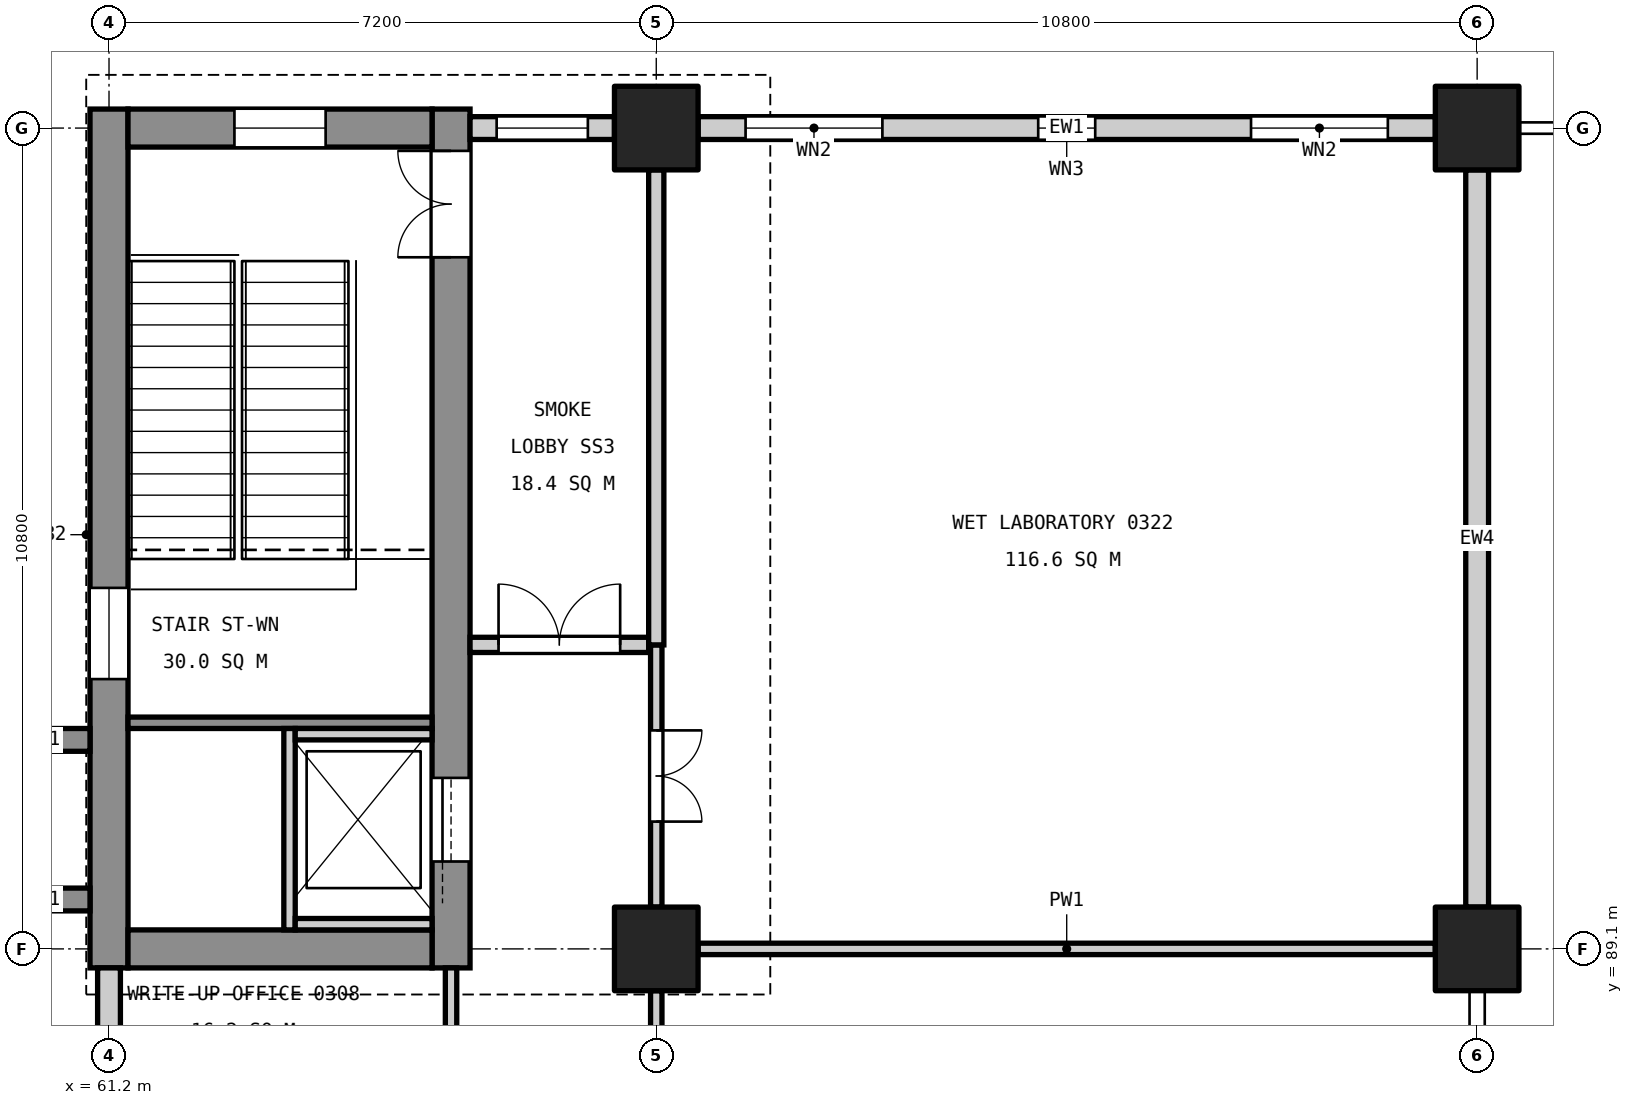
"""IFC4 building model, lengths in metres.
Left out: names, types, materials, properties, quantities, classifications, styles, units other than length and angle.
Written with IfcOpenShell. Run it as: python <this file> out.ifc"""

import sys

from ifc_helpers import new_model, si_unit, direction, frame, frame_2d, origin, origin_2d, place, context, subcontext, project, spatial, rectangle, extrude, element, fill, save


model = new_model("IFC4")
c1 = context("Model", 3, precision=1e-05, world=origin(), true_north=direction((0.0, 1.0)))
c2 = subcontext(c1, "Body", "Model", "MODEL_VIEW")
j1 = project(units=[si_unit("LENGTHUNIT", "METRE"), si_unit("PLANEANGLEUNIT", "RADIAN")], contexts=[c1])
p1 = place(None, origin())
s1 = spatial("IfcSite", under=j1, at=p1, CompositionType="ELEMENT")
p2 = place(p1, origin())
s2 = spatial("IfcBuilding", under=s1, at=p2, CompositionType="ELEMENT")
p3 = place(p2, frame((0.0, 0.0, 16.8)))
s3 = spatial("IfcBuildingStorey", under=s2, at=p3, CompositionType="ELEMENT", Elevation=16.8)
for number, where, z_axis, x_axis in (
    (1, (68.4, 89.1, 0.0), (0.0, 0.0, 1.0), (1.0, 0.0, 0.0)),
    (2, (68.4, 99.9, 0.0), (0.0, 0.0, 1.0), (1.0, 0.0, 0.0)),
    (3, (79.2, 89.1, 0.0), (0.0, 0.0, 1.0), (1.0, 0.0, 0.0)),
    (4, (79.2, 99.9, 0.0), (0.0, 0.0, 1.0), (1.0, 0.0, 0.0)),
):
    element("IfcColumn", number, at=place(p3, frame(where, z_axis=z_axis, x_axis=x_axis)), inside=s3, PredefinedType="COLUMN", context=c2, shape_type="SweptSolid", body=[
        extrude(rectangle(XDim=1.1, YDim=1.1, at=origin_2d()), origin(), (0.0, 0.0, 1.0), 5.4),
    ])
p4 = place(p3, frame((61.2, 88.85, 0.0), z_axis=(0.0, 0.0, 1.0), x_axis=(0.0, 1.0, 0.0)))
e5 = element("IfcWall", 5, at=p4, inside=s3, PredefinedType="SHEAR", context=c2, shape_type="SweptSolid", body=[
    extrude(rectangle(XDim=11.3, YDim=0.5, at=frame_2d((5.65, 0.0))), origin(), (0.0, 0.0, 1.0), 5.15),
])
p5 = place(p4, frame((3.8, 0.0, 3.4)))
e6 = element("IfcOpeningElement", 6, at=p5, cuts=e5, PredefinedType="OPENING", context=c2, shape_type="SweptSolid", body=[
    extrude(rectangle(XDim=1.2, YDim=0.9, at=frame_2d((0.6, 0.45))), frame((0.0, 0.26, 0.0), z_axis=(0.0, -1.0, 0.0), x_axis=(1.0, 0.0, 0.0)), (0.0, 0.0, 1.0), 0.52),
])
p6 = place(p3, frame((65.7, 88.85, 0.0), z_axis=(0.0, 0.0, 1.0), x_axis=(0.0, 1.0, 0.0)))
e7 = element("IfcWall", 7, at=p6, inside=s3, PredefinedType="SHEAR", context=c2, shape_type="SweptSolid", body=[
    extrude(rectangle(XDim=11.3, YDim=0.5, at=frame_2d((5.65, 0.0))), origin(), (0.0, 0.0, 1.0), 5.15),
])
p7 = place(p6, frame((9.35, 0.0, 0.0)))
e8 = element("IfcOpeningElement", 8, at=p7, cuts=e7, PredefinedType="OPENING", context=c2, shape_type="SweptSolid", body=[
    extrude(rectangle(XDim=1.4, YDim=2.1, at=frame_2d((0.7, 1.05))), frame((0.0, 0.26, 0.0), z_axis=(0.0, -1.0, 0.0), x_axis=(1.0, 0.0, 0.0)), (0.0, 0.0, 1.0), 0.52),
])
p8 = place(p6, frame((1.4, 0.0, 0.0)))
e9 = element("IfcOpeningElement", 9, at=p8, cuts=e7, PredefinedType="OPENING", context=c2, shape_type="SweptSolid", body=[
    extrude(rectangle(XDim=1.1, YDim=2.1, at=frame_2d((0.55, 1.05))), frame((0.0, 0.26, 0.0), z_axis=(0.0, -1.0, 0.0), x_axis=(1.0, 0.0, 0.0)), (0.0, 0.0, 1.0), 0.52),
])
p9 = place(p3, frame((61.45, 89.1, 0.0), z_axis=(0.0, 0.0, 1.0), x_axis=(1.0, 0.0, 0.0)))
e10 = element("IfcWall", 10, at=p9, inside=s3, PredefinedType="SHEAR", context=c2, shape_type="SweptSolid", body=[
    extrude(rectangle(XDim=4.0, YDim=0.5, at=frame_2d((2.0, 0.0))), origin(), (0.0, 0.0, 1.0), 5.15),
])
p10 = place(p3, frame((61.45, 99.9, 0.0), z_axis=(0.0, 0.0, 1.0), x_axis=(1.0, 0.0, 0.0)))
e11 = element("IfcWall", 11, at=p10, inside=s3, PredefinedType="SHEAR", context=c2, shape_type="SweptSolid", body=[
    extrude(rectangle(XDim=4.0, YDim=0.5, at=frame_2d((2.0, 0.0))), origin(), (0.0, 0.0, 1.0), 5.15),
])
p11 = place(p10, frame((1.4, 0.0, 3.4)))
e12 = element("IfcOpeningElement", 12, at=p11, cuts=e11, PredefinedType="OPENING", context=c2, shape_type="SweptSolid", body=[
    extrude(rectangle(XDim=1.2, YDim=0.9, at=frame_2d((0.6, 0.45))), frame((0.0, 0.26, 0.0), z_axis=(0.0, -1.0, 0.0), x_axis=(1.0, 0.0, 0.0)), (0.0, 0.0, 1.0), 0.52),
])
for number, where, z_axis, x_axis in (
    (13, (60.95, 89.75, 0.0), (0.0, 0.0, 1.0), (-1.0, 0.0, 0.0)),
    (14, (60.95, 91.85, 0.0), (0.0, 0.0, 1.0), (-1.0, 0.0, 0.0)),
):
    element("IfcWall", number, at=place(p3, frame(where, z_axis=z_axis, x_axis=x_axis)), inside=s3, PredefinedType="SHEAR", context=c2, shape_type="SweptSolid", body=[
        extrude(rectangle(XDim=1.25, YDim=0.3, at=frame_2d((0.625, 0.0))), origin(), (0.0, 0.0, 1.0), 5.4),
    ])
p12 = place(p3, frame((61.45, 92.075, 0.0), z_axis=(0.0, 0.0, 1.0), x_axis=(1.0, 0.0, 0.0)))
e15 = element("IfcWall", 15, at=p12, inside=s3, PredefinedType="SOLIDWALL", context=c2, shape_type="SweptSolid", body=[
    extrude(rectangle(XDim=4.0, YDim=0.15, at=frame_2d((2.0, 0.0))), origin(), (0.0, 0.0, 1.0), 5.15),
])
p13 = place(p3, frame((63.575, 92.0, 0.0), z_axis=(0.0, 0.0, 1.0), x_axis=(0.0, -1.0, 0.0)))
e16 = element("IfcWall", 16, at=p13, inside=s3, PredefinedType="SOLIDWALL", context=c2, shape_type="SweptSolid", body=[
    extrude(rectangle(XDim=2.65, YDim=0.15, at=frame_2d((1.325, 0.0))), origin(), (0.0, 0.0, 1.0), 5.4),
])
for number, where, z_axis, x_axis in (
    (17, (63.65, 91.925, 0.0), (0.0, 0.0, 1.0), (1.0, 0.0, 0.0)),
    (18, (63.65, 89.425, 0.0), (0.0, 0.0, 1.0), (1.0, 0.0, 0.0)),
):
    element("IfcWall", number, at=place(p3, frame(where, z_axis=z_axis, x_axis=x_axis)), inside=s3, PredefinedType="SOLIDWALL", context=c2, shape_type="SweptSolid", body=[
        extrude(rectangle(XDim=1.8, YDim=0.15, at=frame_2d((0.9, 0.0))), origin(), (0.0, 0.0, 1.0), 5.4),
    ])
p14 = place(p3, frame((61.2, 78.85, 0.0), z_axis=(0.0, 0.0, 1.0), x_axis=(0.0, 1.0, 0.0)))
e19 = element("IfcWall", 19, at=p14, inside=s3, PredefinedType="STANDARD", context=c2, shape_type="SweptSolid", body=[
    extrude(rectangle(XDim=10.0, YDim=0.3, at=frame_2d((5.0, 0.0))), origin(), (0.0, 0.0, 1.0), 4.25),
])
p15 = place(p14, frame((0.625, 0.0, 0.9)))
e20 = element("IfcOpeningElement", 20, at=p15, cuts=e19, PredefinedType="OPENING", context=c2, shape_type="SweptSolid", body=[
    extrude(rectangle(XDim=1.8, YDim=3.0, at=frame_2d((0.9, 1.5))), frame((0.0, 0.16, 0.0), z_axis=(0.0, -1.0, 0.0), x_axis=(1.0, 0.0, 0.0)), (0.0, 0.0, 1.0), 0.32),
])
p16 = place(p14, frame((3.95, 0.0, 0.9)))
e21 = element("IfcOpeningElement", 21, at=p16, cuts=e19, PredefinedType="OPENING", context=c2, shape_type="SweptSolid", body=[
    extrude(rectangle(XDim=1.8, YDim=3.0, at=frame_2d((0.9, 1.5))), frame((0.0, 0.16, 0.0), z_axis=(0.0, -1.0, 0.0), x_axis=(1.0, 0.0, 0.0)), (0.0, 0.0, 1.0), 0.32),
])
p17 = place(p14, frame((7.95, 0.0, 0.8)))
e22 = element("IfcOpeningElement", 22, at=p17, cuts=e19, PredefinedType="OPENING", context=c2, shape_type="SweptSolid", body=[
    extrude(rectangle(XDim=0.75, YDim=1.2, at=frame_2d((0.375, 0.6))), frame((0.0, 0.16, 0.0), z_axis=(0.0, -1.0, 0.0), x_axis=(1.0, 0.0, 0.0)), (0.0, 0.0, 1.0), 0.32),
])
p18 = place(p3, frame((65.95, 99.9, 0.0), z_axis=(0.0, 0.0, 1.0), x_axis=(1.0, 0.0, 0.0)))
e23 = element("IfcWall", 23, at=p18, inside=s3, PredefinedType="STANDARD", context=c2, shape_type="SweptSolid", body=[
    extrude(rectangle(XDim=1.9, YDim=0.3, at=frame_2d((0.95, 0.0))), origin(), (0.0, 0.0, 1.0), 4.45),
])
p19 = place(p18, frame((0.35, 0.0, 0.9)))
e24 = element("IfcOpeningElement", 24, at=p19, cuts=e23, PredefinedType="OPENING", context=c2, shape_type="SweptSolid", body=[
    extrude(rectangle(XDim=1.2, YDim=2.4, at=frame_2d((0.6, 1.2))), frame((0.0, 0.16, 0.0), z_axis=(0.0, -1.0, 0.0), x_axis=(1.0, 0.0, 0.0)), (0.0, 0.0, 1.0), 0.32),
])
p20 = place(p3, frame((68.95, 99.9, 0.0), z_axis=(0.0, 0.0, 1.0), x_axis=(1.0, 0.0, 0.0)))
e25 = element("IfcWall", 25, at=p20, inside=s3, PredefinedType="STANDARD", context=c2, shape_type="SweptSolid", body=[
    extrude(rectangle(XDim=9.7, YDim=0.3, at=frame_2d((4.85, 0.0))), origin(), (0.0, 0.0, 1.0), 4.45),
])
p21 = place(p20, frame((0.625, 0.0, 0.9)))
e26 = element("IfcOpeningElement", 26, at=p21, cuts=e25, PredefinedType="OPENING", context=c2, shape_type="SweptSolid", body=[
    extrude(rectangle(XDim=1.8, YDim=3.0, at=frame_2d((0.9, 1.5))), frame((0.0, 0.16, 0.0), z_axis=(0.0, -1.0, 0.0), x_axis=(1.0, 0.0, 0.0)), (0.0, 0.0, 1.0), 0.32),
])
p22 = place(p20, frame((4.475, 0.0, 0.8)))
e27 = element("IfcOpeningElement", 27, at=p22, cuts=e25, PredefinedType="OPENING", context=c2, shape_type="SweptSolid", body=[
    extrude(rectangle(XDim=0.75, YDim=1.2, at=frame_2d((0.375, 0.6))), frame((0.0, 0.16, 0.0), z_axis=(0.0, -1.0, 0.0), x_axis=(1.0, 0.0, 0.0)), (0.0, 0.0, 1.0), 0.32),
])
p23 = place(p20, frame((7.275, 0.0, 0.9)))
e28 = element("IfcOpeningElement", 28, at=p23, cuts=e25, PredefinedType="OPENING", context=c2, shape_type="SweptSolid", body=[
    extrude(rectangle(XDim=1.8, YDim=3.0, at=frame_2d((0.9, 1.5))), frame((0.0, 0.16, 0.0), z_axis=(0.0, -1.0, 0.0), x_axis=(1.0, 0.0, 0.0)), (0.0, 0.0, 1.0), 0.32),
])
p24 = place(p3, frame((79.2, 89.65, 0.0), z_axis=(0.0, 0.0, 1.0), x_axis=(0.0, 1.0, 0.0)))
e29 = element("IfcWall", 29, at=p24, inside=s3, PredefinedType="STANDARD", context=c2, shape_type="SweptSolid", body=[
    extrude(rectangle(XDim=9.7, YDim=0.3, at=frame_2d((4.85, 0.0))), origin(), (0.0, 0.0, 1.0), 4.15),
])
p25 = place(p3, frame((65.7, 78.45, 0.0), z_axis=(0.0, 0.0, 1.0), x_axis=(0.0, 1.0, 0.0)))
e30 = element("IfcWall", 30, at=p25, inside=s3, PredefinedType="PARTITIONING", context=c2, shape_type="SweptSolid", body=[
    extrude(rectangle(XDim=10.4, YDim=0.15, at=frame_2d((5.2, 0.0))), origin(), (0.0, 0.0, 1.0), 4.05),
])
p26 = place(p25, frame((4.75, 0.0, 0.0)))
e31 = element("IfcOpeningElement", 31, at=p26, cuts=e30, PredefinedType="OPENING", context=c2, shape_type="SweptSolid", body=[
    extrude(rectangle(XDim=1.0, YDim=2.1, at=frame_2d((0.5, 1.05))), frame((0.0, 0.085, 0.0), z_axis=(0.0, -1.0, 0.0), x_axis=(1.0, 0.0, 0.0)), (0.0, 0.0, 1.0), 0.17),
])
p27 = place(p25, frame((1.15, 0.0, 0.0)))
e32 = element("IfcOpeningElement", 32, at=p27, cuts=e30, PredefinedType="OPENING", context=c2, shape_type="SweptSolid", body=[
    extrude(rectangle(XDim=1.0, YDim=2.1, at=frame_2d((0.5, 1.05))), frame((0.0, 0.085, 0.0), z_axis=(0.0, -1.0, 0.0), x_axis=(1.0, 0.0, 0.0)), (0.0, 0.0, 1.0), 0.17),
])
p28 = place(p25, frame((8.35, 0.0, 0.0)))
e33 = element("IfcOpeningElement", 33, at=p28, cuts=e30, PredefinedType="OPENING", context=c2, shape_type="SweptSolid", body=[
    extrude(rectangle(XDim=1.0, YDim=2.1, at=frame_2d((0.5, 1.05))), frame((0.0, 0.085, 0.0), z_axis=(0.0, -1.0, 0.0), x_axis=(1.0, 0.0, 0.0)), (0.0, 0.0, 1.0), 0.17),
])
p29 = place(p3, frame((65.95, 93.1, 0.0), z_axis=(0.0, 0.0, 1.0), x_axis=(1.0, 0.0, 0.0)))
e34 = element("IfcWall", 34, at=p29, inside=s3, PredefinedType="PARTITIONING", context=c2, shape_type="SweptSolid", body=[
    extrude(rectangle(XDim=2.35, YDim=0.2, at=frame_2d((1.175, 0.0))), origin(), (0.0, 0.0, 1.0), 4.05),
])
p30 = place(p29, frame((0.375, 0.0, 0.0)))
e35 = element("IfcOpeningElement", 35, at=p30, cuts=e34, PredefinedType="OPENING", context=c2, shape_type="SweptSolid", body=[
    extrude(rectangle(XDim=1.6, YDim=2.1, at=frame_2d((0.8, 1.05))), frame((0.0, 0.11, 0.0), z_axis=(0.0, -1.0, 0.0), x_axis=(1.0, 0.0, 0.0)), (0.0, 0.0, 1.0), 0.22),
])
p31 = place(p3, frame((68.4, 78.85, 0.0), z_axis=(0.0, 0.0, 1.0), x_axis=(0.0, 1.0, 0.0)))
e36 = element("IfcWall", 36, at=p31, inside=s3, PredefinedType="PARTITIONING", context=c2, shape_type="SweptSolid", body=[
    extrude(rectangle(XDim=9.7, YDim=0.15, at=frame_2d((4.85, 0.0))), origin(), (0.0, 0.0, 1.0), 4.15),
])
p32 = place(p31, frame((5.775, 0.0, 0.0)))
e37 = element("IfcOpeningElement", 37, at=p32, cuts=e36, PredefinedType="OPENING", context=c2, shape_type="SweptSolid", body=[
    extrude(rectangle(XDim=1.2, YDim=2.1, at=frame_2d((0.6, 1.05))), frame((0.0, 0.085, 0.0), z_axis=(0.0, -1.0, 0.0), x_axis=(1.0, 0.0, 0.0)), (0.0, 0.0, 1.0), 0.17),
])
p33 = place(p31, frame((0.925, 0.0, 0.0)))
e38 = element("IfcOpeningElement", 38, at=p33, cuts=e36, PredefinedType="OPENING", context=c2, shape_type="SweptSolid", body=[
    extrude(rectangle(XDim=1.2, YDim=2.1, at=frame_2d((0.6, 1.05))), frame((0.0, 0.085, 0.0), z_axis=(0.0, -1.0, 0.0), x_axis=(1.0, 0.0, 0.0)), (0.0, 0.0, 1.0), 0.17),
])
p34 = place(p3, frame((68.4, 89.65, 0.0), z_axis=(0.0, 0.0, 1.0), x_axis=(0.0, 1.0, 0.0)))
e39 = element("IfcWall", 39, at=p34, inside=s3, PredefinedType="PARTITIONING", context=c2, shape_type="SweptSolid", body=[
    extrude(rectangle(XDim=3.45, YDim=0.15, at=frame_2d((1.725, 0.0))), origin(), (0.0, 0.0, 1.0), 4.15),
])
p35 = place(p34, frame((1.125, 0.0, 0.0)))
e40 = element("IfcOpeningElement", 40, at=p35, cuts=e39, PredefinedType="OPENING", context=c2, shape_type="SweptSolid", body=[
    extrude(rectangle(XDim=1.2, YDim=2.1, at=frame_2d((0.6, 1.05))), frame((0.0, 0.085, 0.0), z_axis=(0.0, -1.0, 0.0), x_axis=(1.0, 0.0, 0.0)), (0.0, 0.0, 1.0), 0.17),
])
p36 = place(p3, frame((68.4, 93.1, 0.0), z_axis=(0.0, 0.0, 1.0), x_axis=(0.0, 1.0, 0.0)))
e41 = element("IfcWall", 41, at=p36, inside=s3, PredefinedType="PARTITIONING", context=c2, shape_type="SweptSolid", body=[
    extrude(rectangle(XDim=6.25, YDim=0.2, at=frame_2d((3.125, 0.0))), origin(), (0.0, 0.0, 1.0), 4.15),
])
p37 = place(p3, frame((68.95, 89.1, 0.0), z_axis=(0.0, 0.0, 1.0), x_axis=(1.0, 0.0, 0.0)))
e42 = element("IfcWall", 42, at=p37, inside=s3, PredefinedType="PARTITIONING", context=c2, shape_type="SweptSolid", body=[
    extrude(rectangle(XDim=9.7, YDim=0.15, at=frame_2d((4.85, 0.0))), origin(), (0.0, 0.0, 1.0), 4.05),
])
p38 = place(p7, origin())
e43 = element("IfcDoor", 43, at=p38, inside=s3, OperationType="DOUBLE_DOOR_SINGLE_SWING", PredefinedType="DOOR", context=c2, shape_type="SweptSolid", body=[
    extrude(rectangle(XDim=1.4, YDim=2.1, at=frame_2d((0.7, 1.05))), frame((0.0, 0.025, 0.0), z_axis=(0.0, -1.0, 0.0), x_axis=(1.0, 0.0, 0.0)), (0.0, 0.0, 1.0), 0.05),
])
fill(e8, e43)
p39 = place(p8, origin())
e44 = element("IfcDoor", 44, at=p39, inside=s3, OperationType="SLIDING_TO_LEFT", PredefinedType="DOOR", context=c2, shape_type="SweptSolid", body=[
    extrude(rectangle(XDim=1.1, YDim=2.1, at=frame_2d((0.55, 1.05))), frame((0.0, 0.025, 0.0), z_axis=(0.0, -1.0, 0.0), x_axis=(1.0, 0.0, 0.0)), (0.0, 0.0, 1.0), 0.05),
])
fill(e9, e44)
p40 = place(p19, origin())
e45 = element("IfcWindow", 45, at=p40, inside=s3, PartitioningType="SINGLE_PANEL", PredefinedType="WINDOW", context=c2, shape_type="SweptSolid", body=[
    extrude(rectangle(XDim=1.2, YDim=2.4, at=frame_2d((0.6, 1.2))), frame((0.0, 0.03, 0.0), z_axis=(0.0, -1.0, 0.0), x_axis=(1.0, 0.0, 0.0)), (0.0, 0.0, 1.0), 0.06),
])
fill(e24, e45)
p41 = place(p21, origin())
e46 = element("IfcWindow", 46, at=p41, inside=s3, PartitioningType="SINGLE_PANEL", PredefinedType="WINDOW", context=c2, shape_type="SweptSolid", body=[
    extrude(rectangle(XDim=1.8, YDim=3.0, at=frame_2d((0.9, 1.5))), frame((0.0, 0.03, 0.0), z_axis=(0.0, -1.0, 0.0), x_axis=(1.0, 0.0, 0.0)), (0.0, 0.0, 1.0), 0.06),
])
fill(e26, e46)
p42 = place(p22, origin())
e47 = element("IfcWindow", 47, at=p42, inside=s3, PartitioningType="SINGLE_PANEL", PredefinedType="WINDOW", context=c2, shape_type="SweptSolid", body=[
    extrude(rectangle(XDim=0.75, YDim=1.2, at=frame_2d((0.375, 0.6))), frame((0.0, 0.03, 0.0), z_axis=(0.0, -1.0, 0.0), x_axis=(1.0, 0.0, 0.0)), (0.0, 0.0, 1.0), 0.06),
])
fill(e27, e47)
p43 = place(p23, origin())
e48 = element("IfcWindow", 48, at=p43, inside=s3, PartitioningType="SINGLE_PANEL", PredefinedType="WINDOW", context=c2, shape_type="SweptSolid", body=[
    extrude(rectangle(XDim=1.8, YDim=3.0, at=frame_2d((0.9, 1.5))), frame((0.0, 0.03, 0.0), z_axis=(0.0, -1.0, 0.0), x_axis=(1.0, 0.0, 0.0)), (0.0, 0.0, 1.0), 0.06),
])
fill(e28, e48)
p44 = place(p5, origin())
e49 = element("IfcWindow", 49, at=p44, inside=s3, PartitioningType="SINGLE_PANEL", PredefinedType="WINDOW", context=c2, shape_type="SweptSolid", body=[
    extrude(rectangle(XDim=1.2, YDim=0.9, at=frame_2d((0.6, 0.45))), frame((0.0, 0.03, 0.0), z_axis=(0.0, -1.0, 0.0), x_axis=(1.0, 0.0, 0.0)), (0.0, 0.0, 1.0), 0.06),
])
fill(e6, e49)
p45 = place(p11, origin())
e50 = element("IfcWindow", 50, at=p45, inside=s3, PartitioningType="SINGLE_PANEL", PredefinedType="WINDOW", context=c2, shape_type="SweptSolid", body=[
    extrude(rectangle(XDim=1.2, YDim=0.9, at=frame_2d((0.6, 0.45))), frame((0.0, 0.03, 0.0), z_axis=(0.0, -1.0, 0.0), x_axis=(1.0, 0.0, 0.0)), (0.0, 0.0, 1.0), 0.06),
])
fill(e12, e50)
p46 = place(p35, frame((1.2, 0.0, 0.0), z_axis=(0.0, 0.0, 1.0), x_axis=(-1.0, 0.0, 0.0)))
e51 = element("IfcDoor", 51, at=p46, inside=s3, OperationType="DOUBLE_DOOR_SINGLE_SWING", PredefinedType="DOOR", context=c2, shape_type="SweptSolid", body=[
    extrude(rectangle(XDim=1.2, YDim=2.1, at=frame_2d((0.6, 1.05))), frame((0.0, 0.025, 0.0), z_axis=(0.0, -1.0, 0.0), x_axis=(1.0, 0.0, 0.0)), (0.0, 0.0, 1.0), 0.05),
])
fill(e40, e51)
p47 = place(p30, origin())
e52 = element("IfcDoor", 52, at=p47, inside=s3, OperationType="DOUBLE_DOOR_SINGLE_SWING", PredefinedType="DOOR", context=c2, shape_type="SweptSolid", body=[
    extrude(rectangle(XDim=1.6, YDim=2.1, at=frame_2d((0.8, 1.05))), frame((0.0, 0.025, 0.0), z_axis=(0.0, -1.0, 0.0), x_axis=(1.0, 0.0, 0.0)), (0.0, 0.0, 1.0), 0.05),
])
fill(e35, e52)
save(model, sys.argv[1])
